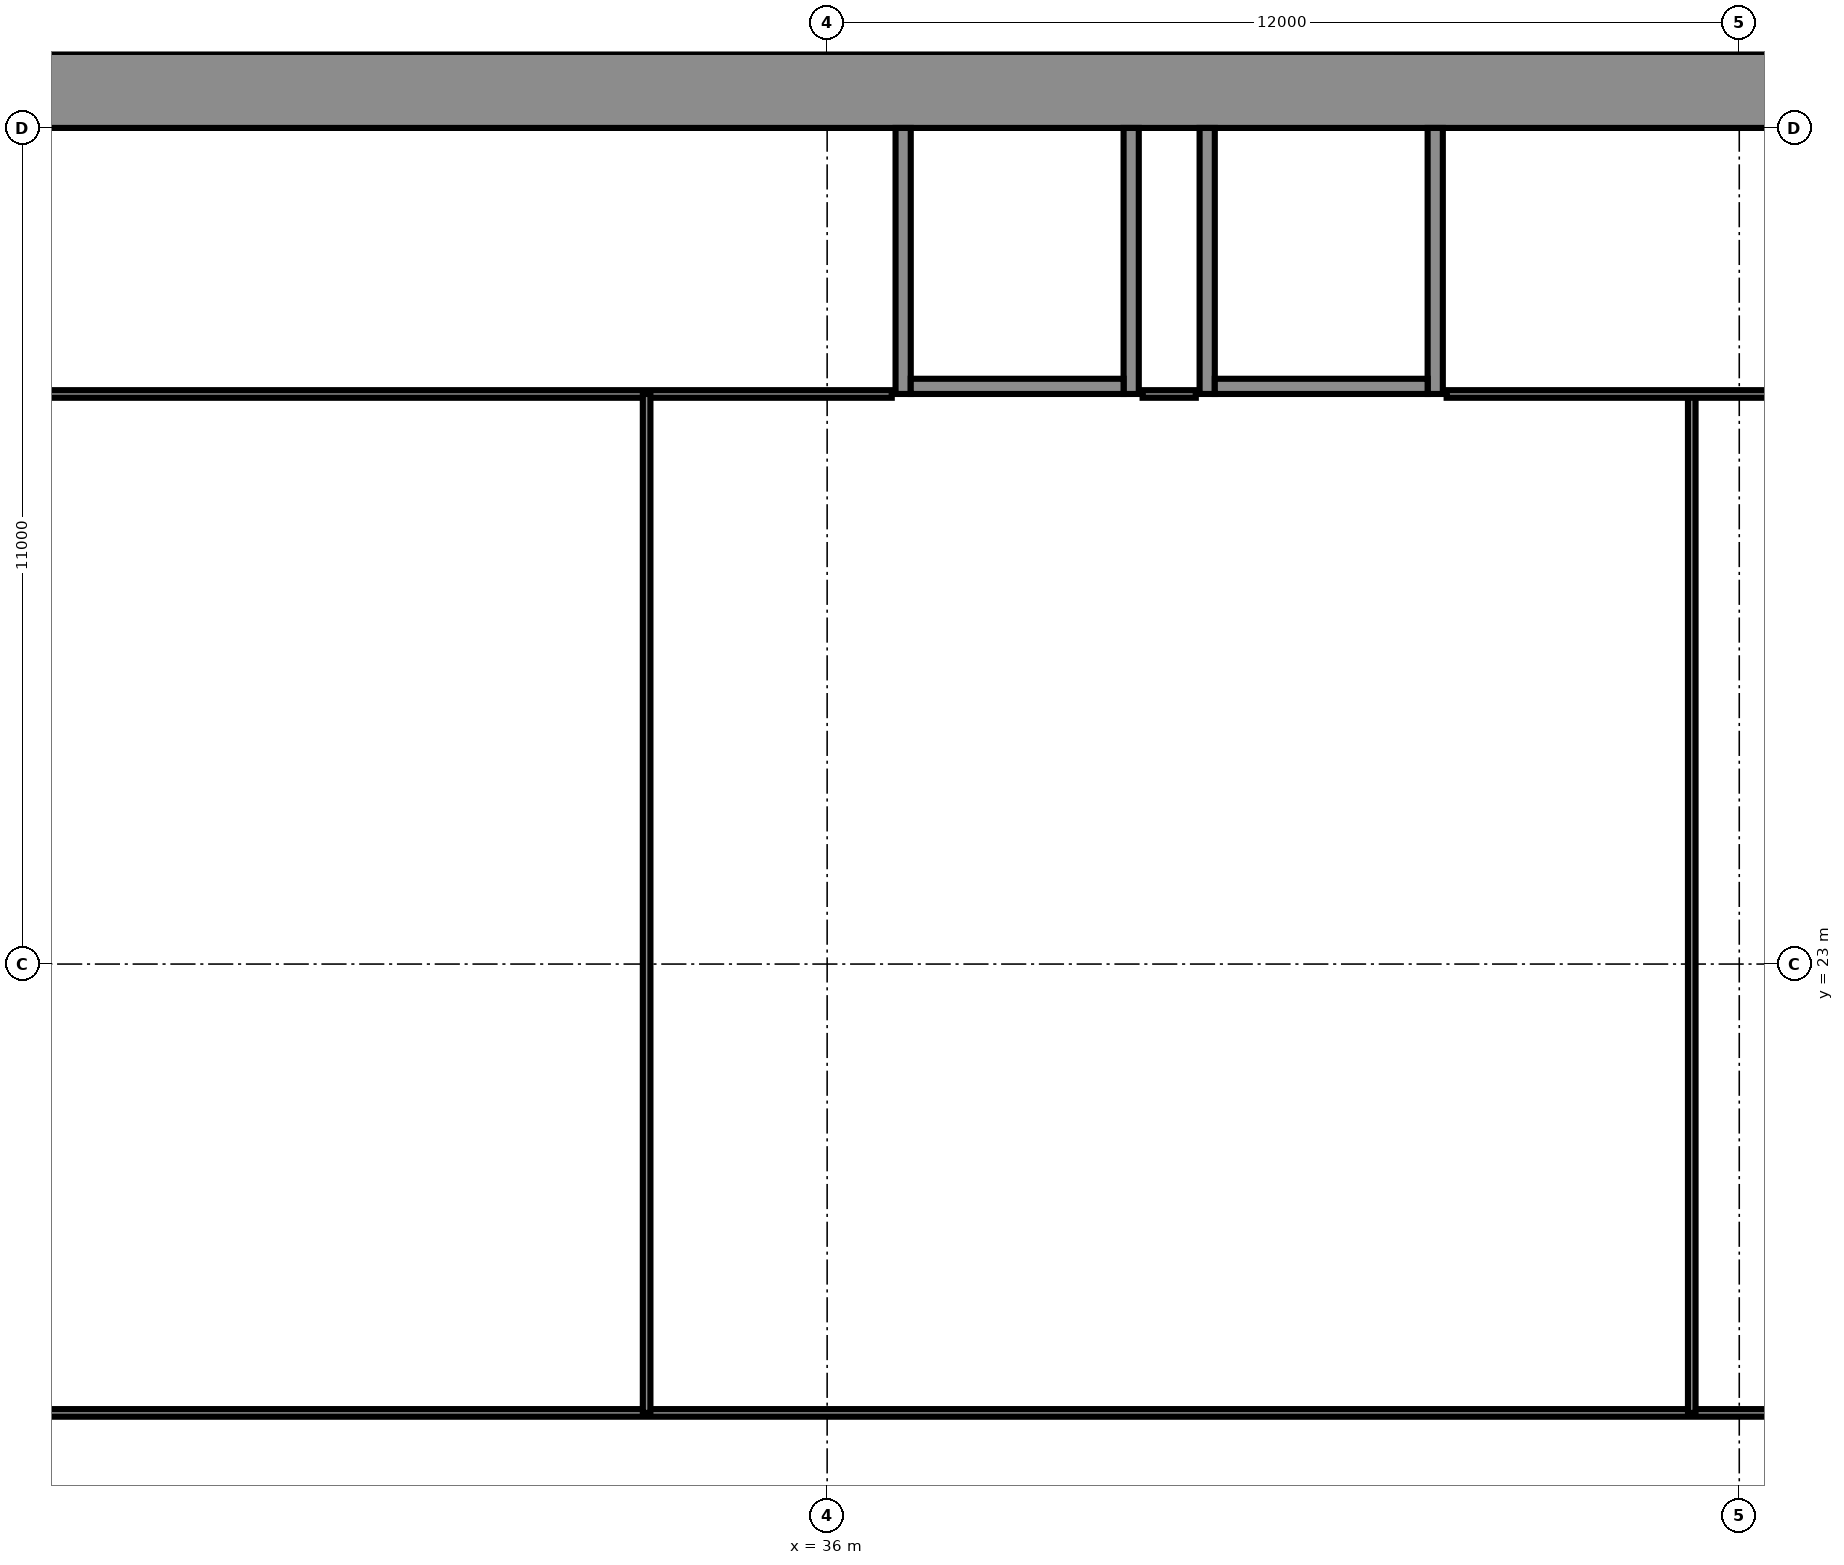
"""IFC4 building model, lengths in metres.
Left out: names, types, materials, properties, quantities, classifications, styles, units other than length and angle.
Written with IfcOpenShell. Run it as: python <this file> out.ifc"""

import sys

from ifc_helpers import new_model, si_unit, direction, frame, frame_2d, origin, origin_2d, place, context, subcontext, project, spatial, rectangle, i_section, extrude, element, fill, save


model = new_model("IFC4")
c1 = context("Model", 3, precision=1e-05, world=origin(), true_north=direction((0.0, 1.0)))
c2 = subcontext(c1, "Body", "Model", "MODEL_VIEW")
j1 = project(units=[si_unit("LENGTHUNIT", "METRE"), si_unit("PLANEANGLEUNIT", "RADIAN")], contexts=[c1])
p1 = place(None, origin())
s1 = spatial("IfcSite", under=j1, at=p1, CompositionType="ELEMENT")
p2 = place(p1, origin())
s2 = spatial("IfcBuilding", under=s1, at=p2, CompositionType="ELEMENT")
p3 = place(p2, frame((0.0, 0.0, 96.7)))
s3 = spatial("IfcBuildingStorey", under=s2, at=p3, CompositionType="ELEMENT", Elevation=96.7)
p4 = place(p3, frame((16.0, 34.5, 0.0), z_axis=(0.0, 0.0, 1.0), x_axis=(1.0, 0.0, 0.0)))
e1 = element("IfcWall", 1, at=p4, inside=s3, PredefinedType="SHEAR", context=c2, shape_type="SweptSolid", body=[
    extrude(rectangle(XDim=49.0, YDim=1.0, at=frame_2d((24.5, 0.0))), origin(), (0.0, 0.0, 1.0), 3.6),
])
p5 = place(p4, frame((1.2, 0.0, 0.0)))
e2 = element("IfcOpeningElement", 2, at=p5, cuts=e1, PredefinedType="OPENING", context=c2, shape_type="SweptSolid", body=[
    extrude(rectangle(XDim=1.1, YDim=2.1, at=frame_2d((0.55, 1.05))), frame((0.0, 0.51, 0.0), z_axis=(0.0, -1.0, 0.0), x_axis=(1.0, 0.0, 0.0)), (0.0, 0.0, 1.0), 1.02),
])
p6 = place(p4, frame((5.083, 0.0, 0.0)))
e3 = element("IfcOpeningElement", 3, at=p6, cuts=e1, PredefinedType="OPENING", context=c2, shape_type="SweptSolid", body=[
    extrude(rectangle(XDim=1.1, YDim=2.1, at=frame_2d((0.55, 1.05))), frame((0.0, 0.51, 0.0), z_axis=(0.0, -1.0, 0.0), x_axis=(1.0, 0.0, 0.0)), (0.0, 0.0, 1.0), 1.02),
])
p7 = place(p4, frame((2.933, 0.0, 0.0)))
e4 = element("IfcOpeningElement", 4, at=p7, cuts=e1, PredefinedType="OPENING", context=c2, shape_type="SweptSolid", body=[
    extrude(rectangle(XDim=1.4, YDim=2.1, at=frame_2d((0.7, 1.05))), frame((0.0, 0.51, 0.0), z_axis=(0.0, -1.0, 0.0), x_axis=(1.0, 0.0, 0.0)), (0.0, 0.0, 1.0), 1.02),
])
p8 = place(p4, frame((7.65, 0.0, 0.0)))
e5 = element("IfcOpeningElement", 5, at=p8, cuts=e1, PredefinedType="OPENING", context=c2, shape_type="SweptSolid", body=[
    extrude(rectangle(XDim=1.2, YDim=2.1, at=frame_2d((0.6, 1.05))), frame((0.0, 0.51, 0.0), z_axis=(0.0, -1.0, 0.0), x_axis=(1.0, 0.0, 0.0)), (0.0, 0.0, 1.0), 1.02),
])
p9 = place(p4, frame((14.817, 0.0, 0.0)))
e6 = element("IfcOpeningElement", 6, at=p9, cuts=e1, PredefinedType="OPENING", context=c2, shape_type="SweptSolid", body=[
    extrude(rectangle(XDim=1.1, YDim=2.1, at=frame_2d((0.55, 1.05))), frame((0.0, 0.51, 0.0), z_axis=(0.0, -1.0, 0.0), x_axis=(1.0, 0.0, 0.0)), (0.0, 0.0, 1.0), 1.02),
])
p10 = place(p4, frame((19.083, 0.0, 0.0)))
e7 = element("IfcOpeningElement", 7, at=p10, cuts=e1, PredefinedType="OPENING", context=c2, shape_type="SweptSolid", body=[
    extrude(rectangle(XDim=1.1, YDim=2.1, at=frame_2d((0.55, 1.05))), frame((0.0, 0.51, 0.0), z_axis=(0.0, -1.0, 0.0), x_axis=(1.0, 0.0, 0.0)), (0.0, 0.0, 1.0), 1.02),
])
p11 = place(p4, frame((16.8, 0.0, 0.0)))
e8 = element("IfcOpeningElement", 8, at=p11, cuts=e1, PredefinedType="OPENING", context=c2, shape_type="SweptSolid", body=[
    extrude(rectangle(XDim=1.4, YDim=2.1, at=frame_2d((0.7, 1.05))), frame((0.0, 0.51, 0.0), z_axis=(0.0, -1.0, 0.0), x_axis=(1.0, 0.0, 0.0)), (0.0, 0.0, 1.0), 1.02),
])
p12 = place(p4, frame((21.817, 0.0, 0.0)))
e9 = element("IfcOpeningElement", 9, at=p12, cuts=e1, PredefinedType="OPENING", context=c2, shape_type="SweptSolid", body=[
    extrude(rectangle(XDim=1.1, YDim=2.1, at=frame_2d((0.55, 1.05))), frame((0.0, 0.51, 0.0), z_axis=(0.0, -1.0, 0.0), x_axis=(1.0, 0.0, 0.0)), (0.0, 0.0, 1.0), 1.02),
])
p13 = place(p4, frame((26.083, 0.0, 0.0)))
e10 = element("IfcOpeningElement", 10, at=p13, cuts=e1, PredefinedType="OPENING", context=c2, shape_type="SweptSolid", body=[
    extrude(rectangle(XDim=1.1, YDim=2.1, at=frame_2d((0.55, 1.05))), frame((0.0, 0.51, 0.0), z_axis=(0.0, -1.0, 0.0), x_axis=(1.0, 0.0, 0.0)), (0.0, 0.0, 1.0), 1.02),
])
p14 = place(p4, frame((33.15, 0.0, 0.0)))
e11 = element("IfcOpeningElement", 11, at=p14, cuts=e1, PredefinedType="OPENING", context=c2, shape_type="SweptSolid", body=[
    extrude(rectangle(XDim=1.2, YDim=2.1, at=frame_2d((0.6, 1.05))), frame((0.0, 0.51, 0.0), z_axis=(0.0, -1.0, 0.0), x_axis=(1.0, 0.0, 0.0)), (0.0, 0.0, 1.0), 1.02),
])
p15 = place(p4, frame((37.8, 0.0, 0.0)))
e12 = element("IfcOpeningElement", 12, at=p15, cuts=e1, PredefinedType="OPENING", context=c2, shape_type="SweptSolid", body=[
    extrude(rectangle(XDim=1.4, YDim=2.1, at=frame_2d((0.7, 1.05))), frame((0.0, 0.51, 0.0), z_axis=(0.0, -1.0, 0.0), x_axis=(1.0, 0.0, 0.0)), (0.0, 0.0, 1.0), 1.02),
])
p16 = place(p4, frame((42.817, 0.0, 0.0)))
e13 = element("IfcOpeningElement", 13, at=p16, cuts=e1, PredefinedType="OPENING", context=c2, shape_type="SweptSolid", body=[
    extrude(rectangle(XDim=1.1, YDim=2.1, at=frame_2d((0.55, 1.05))), frame((0.0, 0.51, 0.0), z_axis=(0.0, -1.0, 0.0), x_axis=(1.0, 0.0, 0.0)), (0.0, 0.0, 1.0), 1.02),
])
p17 = place(p4, frame((46.7, 0.0, 0.0)))
e14 = element("IfcOpeningElement", 14, at=p17, cuts=e1, PredefinedType="OPENING", context=c2, shape_type="SweptSolid", body=[
    extrude(rectangle(XDim=1.1, YDim=2.1, at=frame_2d((0.55, 1.05))), frame((0.0, 0.51, 0.0), z_axis=(0.0, -1.0, 0.0), x_axis=(1.0, 0.0, 0.0)), (0.0, 0.0, 1.0), 1.02),
])
p18 = place(p4, frame((44.667, 0.0, 0.0)))
e15 = element("IfcOpeningElement", 15, at=p18, cuts=e1, PredefinedType="OPENING", context=c2, shape_type="SweptSolid", body=[
    extrude(rectangle(XDim=1.4, YDim=2.1, at=frame_2d((0.7, 1.05))), frame((0.0, 0.51, 0.0), z_axis=(0.0, -1.0, 0.0), x_axis=(1.0, 0.0, 0.0)), (0.0, 0.0, 1.0), 1.02),
])
for number, where, z_axis, x_axis in (
    (16, (36.0, 23.0, 0.0), (0.0, 0.0, 1.0), (1.0, 0.0, 0.0)),
    (17, (48.0, 23.0, 0.0), (0.0, 0.0, 1.0), (1.0, 0.0, 0.0)),
):
    element("IfcColumn", number, at=place(p3, frame(where, z_axis=z_axis, x_axis=x_axis)), inside=s3, PredefinedType="COLUMN", context=c2, shape_type="SweptSolid", body=[
        extrude(i_section(OverallWidth=0.306, OverallDepth=0.524, WebThickness=0.021, FlangeThickness=0.04, FilletRadius=0.027, at=origin_2d()), origin(), (0.0, 0.0, 1.0), 3.6),
    ])
p19 = place(p3, frame((37.0, 30.5, 0.0), z_axis=(0.0, 0.0, 1.0), x_axis=(0.0, 1.0, 0.0)))
e18 = element("IfcWall", 18, at=p19, inside=s3, PredefinedType="PARTITIONING", context=c2, shape_type="SweptSolid", body=[
    extrude(rectangle(XDim=3.5, YDim=0.2, at=frame_2d((1.75, 0.0))), origin(), (0.0, 0.0, 1.0), 3.2),
])
p20 = place(p19, frame((1.2, 0.0, 0.0)))
e19 = element("IfcOpeningElement", 19, at=p20, cuts=e18, PredefinedType="OPENING", context=c2, shape_type="SweptSolid", body=[
    extrude(rectangle(XDim=1.1, YDim=2.1, at=frame_2d((0.55, 1.05))), frame((0.0, 0.11, 0.0), z_axis=(0.0, -1.0, 0.0), x_axis=(1.0, 0.0, 0.0)), (0.0, 0.0, 1.0), 0.22),
])
p21 = place(p3, frame((40.0, 30.5, 0.0), z_axis=(0.0, 0.0, 1.0), x_axis=(0.0, 1.0, 0.0)))
e20 = element("IfcWall", 20, at=p21, inside=s3, PredefinedType="PARTITIONING", context=c2, shape_type="SweptSolid", body=[
    extrude(rectangle(XDim=3.5, YDim=0.2, at=frame_2d((1.75, 0.0))), origin(), (0.0, 0.0, 1.0), 3.2),
])
p22 = place(p3, frame((37.1, 30.6, 0.0), z_axis=(0.0, 0.0, 1.0), x_axis=(1.0, 0.0, 0.0)))
e21 = element("IfcWall", 21, at=p22, inside=s3, PredefinedType="PARTITIONING", context=c2, shape_type="SweptSolid", body=[
    extrude(rectangle(XDim=2.8, YDim=0.2, at=frame_2d((1.4, 0.0))), origin(), (0.0, 0.0, 1.0), 3.2),
])
p23 = place(p3, frame((41.0, 30.5, 0.0), z_axis=(0.0, 0.0, 1.0), x_axis=(0.0, 1.0, 0.0)))
e22 = element("IfcWall", 22, at=p23, inside=s3, PredefinedType="PARTITIONING", context=c2, shape_type="SweptSolid", body=[
    extrude(rectangle(XDim=3.5, YDim=0.2, at=frame_2d((1.75, 0.0))), origin(), (0.0, 0.0, 1.0), 3.2),
])
p24 = place(p3, frame((44.0, 30.5, 0.0), z_axis=(0.0, 0.0, 1.0), x_axis=(0.0, 1.0, 0.0)))
e23 = element("IfcWall", 23, at=p24, inside=s3, PredefinedType="PARTITIONING", context=c2, shape_type="SweptSolid", body=[
    extrude(rectangle(XDim=3.5, YDim=0.2, at=frame_2d((1.75, 0.0))), origin(), (0.0, 0.0, 1.0), 3.2),
])
p25 = place(p24, frame((1.2, 0.0, 0.0)))
e24 = element("IfcOpeningElement", 24, at=p25, cuts=e23, PredefinedType="OPENING", context=c2, shape_type="SweptSolid", body=[
    extrude(rectangle(XDim=1.1, YDim=2.1, at=frame_2d((0.55, 1.05))), frame((0.0, 0.11, 0.0), z_axis=(0.0, -1.0, 0.0), x_axis=(1.0, 0.0, 0.0)), (0.0, 0.0, 1.0), 0.22),
])
p26 = place(p3, frame((41.1, 30.6, 0.0), z_axis=(0.0, 0.0, 1.0), x_axis=(1.0, 0.0, 0.0)))
e25 = element("IfcWall", 25, at=p26, inside=s3, PredefinedType="PARTITIONING", context=c2, shape_type="SweptSolid", body=[
    extrude(rectangle(XDim=2.8, YDim=0.2, at=frame_2d((1.4, 0.0))), origin(), (0.0, 0.0, 1.0), 3.2),
])
p27 = place(p3, frame((17.8, 17.095, 0.0), z_axis=(0.0, 0.0, 1.0), x_axis=(1.0, 0.0, 0.0)))
e26 = element("IfcWall", 26, at=p27, inside=s3, PredefinedType="PARTITIONING", context=c2, shape_type="SweptSolid", body=[
    extrude(rectangle(XDim=67.8, YDim=0.1, at=frame_2d((33.9, 0.0))), origin(), (0.0, 0.0, 1.0), 3.2),
])
p28 = place(p27, frame((12.0, 0.0, 0.0)))
e27 = element("IfcOpeningElement", 27, at=p28, cuts=e26, PredefinedType="OPENING", context=c2, shape_type="SweptSolid", body=[
    extrude(rectangle(XDim=1.0, YDim=2.1, at=frame_2d((0.5, 1.05))), frame((0.0, 0.06, 0.0), z_axis=(0.0, -1.0, 0.0), x_axis=(1.0, 0.0, 0.0)), (0.0, 0.0, 1.0), 0.12),
])
p29 = place(p27, frame((48.5, 0.0, 0.0)))
e28 = element("IfcOpeningElement", 28, at=p29, cuts=e26, PredefinedType="OPENING", context=c2, shape_type="SweptSolid", body=[
    extrude(rectangle(XDim=1.8, YDim=2.1, at=frame_2d((0.9, 1.05))), frame((0.0, 0.06, 0.0), z_axis=(0.0, -1.0, 0.0), x_axis=(1.0, 0.0, 0.0)), (0.0, 0.0, 1.0), 0.12),
])
p30 = place(p27, frame((56.825, 0.0, 0.0)))
e29 = element("IfcOpeningElement", 29, at=p30, cuts=e26, PredefinedType="OPENING", context=c2, shape_type="SweptSolid", body=[
    extrude(rectangle(XDim=1.0, YDim=2.1, at=frame_2d((0.5, 1.05))), frame((0.0, 0.06, 0.0), z_axis=(0.0, -1.0, 0.0), x_axis=(1.0, 0.0, 0.0)), (0.0, 0.0, 1.0), 0.12),
])
p31 = place(p27, frame((60.825, 0.0, 0.0)))
e30 = element("IfcOpeningElement", 30, at=p31, cuts=e26, PredefinedType="OPENING", context=c2, shape_type="SweptSolid", body=[
    extrude(rectangle(XDim=1.0, YDim=2.1, at=frame_2d((0.5, 1.05))), frame((0.0, 0.06, 0.0), z_axis=(0.0, -1.0, 0.0), x_axis=(1.0, 0.0, 0.0)), (0.0, 0.0, 1.0), 0.12),
])
p32 = place(p27, frame((64.981, 0.0, 0.0)))
e31 = element("IfcOpeningElement", 31, at=p32, cuts=e26, PredefinedType="OPENING", context=c2, shape_type="SweptSolid", body=[
    extrude(rectangle(XDim=1.0, YDim=2.1, at=frame_2d((0.5, 1.05))), frame((0.0, 0.06, 0.0), z_axis=(0.0, -1.0, 0.0), x_axis=(1.0, 0.0, 0.0)), (0.0, 0.0, 1.0), 0.12),
])
p33 = place(p3, frame((18.455, 30.5, 0.0), z_axis=(0.0, 0.0, 1.0), x_axis=(1.0, 0.0, 0.0)))
e32 = element("IfcWall", 32, at=p33, inside=s3, PredefinedType="PARTITIONING", context=c2, shape_type="SweptSolid", body=[
    extrude(rectangle(XDim=18.395, YDim=0.1, at=frame_2d((9.198, 0.0))), origin(), (0.0, 0.0, 1.0), 3.2),
])
p34 = place(p33, frame((16.39, 0.0, 0.0)))
e33 = element("IfcOpeningElement", 33, at=p34, cuts=e32, PredefinedType="OPENING", context=c2, shape_type="SweptSolid", body=[
    extrude(rectangle(XDim=1.0, YDim=2.1, at=frame_2d((0.5, 1.05))), frame((0.0, 0.06, 0.0), z_axis=(0.0, -1.0, 0.0), x_axis=(1.0, 0.0, 0.0)), (0.0, 0.0, 1.0), 0.12),
])
for number, where, z_axis, x_axis in (
    (34, (26.75, 17.095, 0.0), (0.0, 0.0, 1.0), (0.0, 1.0, 0.0)),
    (35, (33.625, 17.095, 0.0), (0.0, 0.0, 1.0), (0.0, 1.0, 0.0)),
    (36, (47.375, 17.095, 0.0), (0.0, 0.0, 1.0), (0.0, 1.0, 0.0)),
):
    element("IfcWall", number, at=place(p3, frame(where, z_axis=z_axis, x_axis=x_axis)), inside=s3, PredefinedType="PARTITIONING", context=c2, shape_type="SweptSolid", body=[
        extrude(rectangle(XDim=13.405, YDim=0.1, at=frame_2d((6.703, 0.0))), origin(), (0.0, 0.0, 1.0), 3.2),
    ])
p35 = place(p3, frame((40.15, 30.5, 0.0), z_axis=(0.0, 0.0, 1.0), x_axis=(1.0, 0.0, 0.0)))
e37 = element("IfcWall", 37, at=p35, inside=s3, PredefinedType="PARTITIONING", context=c2, shape_type="SweptSolid", body=[
    extrude(rectangle(XDim=0.7, YDim=0.1, at=frame_2d((0.35, 0.0))), origin(), (0.0, 0.0, 1.0), 3.2),
])
p36 = place(p3, frame((44.15, 30.5, 0.0), z_axis=(0.0, 0.0, 1.0), x_axis=(1.0, 0.0, 0.0)))
e38 = element("IfcWall", 38, at=p36, inside=s3, PredefinedType="PARTITIONING", context=c2, shape_type="SweptSolid", body=[
    extrude(rectangle(XDim=19.425, YDim=0.1, at=frame_2d((9.712, 0.0))), origin(), (0.0, 0.0, 1.0), 3.2),
])
p37 = place(p36, frame((6.245, 0.0, 0.0)))
e39 = element("IfcOpeningElement", 39, at=p37, cuts=e38, PredefinedType="OPENING", context=c2, shape_type="SweptSolid", body=[
    extrude(rectangle(XDim=1.0, YDim=2.1, at=frame_2d((0.5, 1.05))), frame((0.0, 0.06, 0.0), z_axis=(0.0, -1.0, 0.0), x_axis=(1.0, 0.0, 0.0)), (0.0, 0.0, 1.0), 0.12),
])
p38 = place(p9, origin())
e40 = element("IfcDoor", 40, at=p38, inside=s3, OperationType="DOUBLE_DOOR_SLIDING", PredefinedType="DOOR", context=c2, shape_type="SweptSolid", body=[
    extrude(rectangle(XDim=1.1, YDim=2.1, at=frame_2d((0.55, 1.05))), frame((0.0, 0.025, 0.0), z_axis=(0.0, -1.0, 0.0), x_axis=(1.0, 0.0, 0.0)), (0.0, 0.0, 1.0), 0.05),
])
fill(e6, e40)
p39 = place(p10, origin())
e41 = element("IfcDoor", 41, at=p39, inside=s3, OperationType="DOUBLE_DOOR_SLIDING", PredefinedType="DOOR", context=c2, shape_type="SweptSolid", body=[
    extrude(rectangle(XDim=1.1, YDim=2.1, at=frame_2d((0.55, 1.05))), frame((0.0, 0.025, 0.0), z_axis=(0.0, -1.0, 0.0), x_axis=(1.0, 0.0, 0.0)), (0.0, 0.0, 1.0), 0.05),
])
fill(e7, e41)
p40 = place(p11, origin())
e42 = element("IfcDoor", 42, at=p40, inside=s3, OperationType="DOUBLE_DOOR_SINGLE_SWING", PredefinedType="DOOR", context=c2, shape_type="SweptSolid", body=[
    extrude(rectangle(XDim=1.4, YDim=2.1, at=frame_2d((0.7, 1.05))), frame((0.0, 0.025, 0.0), z_axis=(0.0, -1.0, 0.0), x_axis=(1.0, 0.0, 0.0)), (0.0, 0.0, 1.0), 0.05),
])
fill(e8, e42)
p41 = place(p12, origin())
e43 = element("IfcDoor", 43, at=p41, inside=s3, OperationType="DOUBLE_DOOR_SLIDING", PredefinedType="DOOR", context=c2, shape_type="SweptSolid", body=[
    extrude(rectangle(XDim=1.1, YDim=2.1, at=frame_2d((0.55, 1.05))), frame((0.0, 0.025, 0.0), z_axis=(0.0, -1.0, 0.0), x_axis=(1.0, 0.0, 0.0)), (0.0, 0.0, 1.0), 0.05),
])
fill(e9, e43)
p42 = place(p13, origin())
e44 = element("IfcDoor", 44, at=p42, inside=s3, OperationType="DOUBLE_DOOR_SLIDING", PredefinedType="DOOR", context=c2, shape_type="SweptSolid", body=[
    extrude(rectangle(XDim=1.1, YDim=2.1, at=frame_2d((0.55, 1.05))), frame((0.0, 0.025, 0.0), z_axis=(0.0, -1.0, 0.0), x_axis=(1.0, 0.0, 0.0)), (0.0, 0.0, 1.0), 0.05),
])
fill(e10, e44)
p43 = place(p20, origin())
e45 = element("IfcDoor", 45, at=p43, inside=s3, OperationType="SINGLE_SWING_LEFT", PredefinedType="DOOR", context=c2, shape_type="SweptSolid", body=[
    extrude(rectangle(XDim=1.1, YDim=2.1, at=frame_2d((0.55, 1.05))), frame((0.0, 0.025, 0.0), z_axis=(0.0, -1.0, 0.0), x_axis=(1.0, 0.0, 0.0)), (0.0, 0.0, 1.0), 0.05),
])
fill(e19, e45)
p44 = place(p25, origin())
e46 = element("IfcDoor", 46, at=p44, inside=s3, OperationType="SINGLE_SWING_LEFT", PredefinedType="DOOR", context=c2, shape_type="SweptSolid", body=[
    extrude(rectangle(XDim=1.1, YDim=2.1, at=frame_2d((0.55, 1.05))), frame((0.0, 0.025, 0.0), z_axis=(0.0, -1.0, 0.0), x_axis=(1.0, 0.0, 0.0)), (0.0, 0.0, 1.0), 0.05),
])
fill(e24, e46)
p45 = place(p28, origin())
e47 = element("IfcDoor", 47, at=p45, inside=s3, OperationType="SINGLE_SWING_LEFT", PredefinedType="DOOR", context=c2, shape_type="SweptSolid", body=[
    extrude(rectangle(XDim=1.0, YDim=2.1, at=frame_2d((0.5, 1.05))), frame((0.0, 0.025, 0.0), z_axis=(0.0, -1.0, 0.0), x_axis=(1.0, 0.0, 0.0)), (0.0, 0.0, 1.0), 0.05),
])
fill(e27, e47)
p46 = place(p34, origin())
e48 = element("IfcDoor", 48, at=p46, inside=s3, OperationType="SINGLE_SWING_LEFT", PredefinedType="DOOR", context=c2, shape_type="SweptSolid", body=[
    extrude(rectangle(XDim=1.0, YDim=2.1, at=frame_2d((0.5, 1.05))), frame((0.0, 0.025, 0.0), z_axis=(0.0, -1.0, 0.0), x_axis=(1.0, 0.0, 0.0)), (0.0, 0.0, 1.0), 0.05),
])
fill(e33, e48)
save(model, sys.argv[1])
